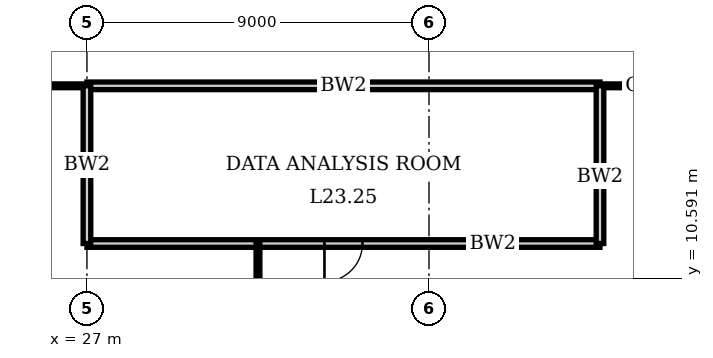
"""IFC4 building model, lengths in metres.
Left out: names, types, materials, properties, quantities, classifications, styles, units other than length and angle.
Written with IfcOpenShell. Run it as: python <this file> out.ifc"""

import sys

from ifc_helpers import new_model, si_unit, direction, frame, frame_2d, origin, place, context, subcontext, project, spatial, rectangle, extrude, element, fill, save


model = new_model("IFC4")
c1 = context("Model", 3, precision=1e-05, world=origin(), true_north=direction((0.0, 1.0)))
c2 = subcontext(c1, "Body", "Model", "MODEL_VIEW")
j1 = project(units=[si_unit("LENGTHUNIT", "METRE"), si_unit("PLANEANGLEUNIT", "RADIAN")], contexts=[c1])
p1 = place(None, origin())
s1 = spatial("IfcSite", under=j1, at=p1, CompositionType="ELEMENT")
p2 = place(p1, origin())
s2 = spatial("IfcBuilding", under=s1, at=p2, CompositionType="ELEMENT")
p3 = place(p2, frame((0.0, 0.0, 97.0)))
s3 = spatial("IfcBuildingStorey", under=s2, at=p3, CompositionType="ELEMENT", Elevation=97.0)
p4 = place(p3, frame((27.0, 11.5, 0.0), z_axis=(0.0, 0.0, 1.0), x_axis=(1.0, 0.0, 0.0)))
e1 = element("IfcWall", 1, at=p4, inside=s3, PredefinedType="SOLIDWALL", context=c2, shape_type="SweptSolid", body=[
    extrude(rectangle(XDim=13.5, YDim=0.2, at=frame_2d((6.75, 0.0))), origin(), (0.0, 0.0, 1.0), 3.75),
])
p5 = place(p4, frame((6.25, 0.0, 0.0)))
e2 = element("IfcOpeningElement", 2, at=p5, cuts=e1, PredefinedType="OPENING", context=c2, shape_type="SweptSolid", body=[
    extrude(rectangle(XDim=1.0, YDim=2.4, at=frame_2d((0.5, 1.2))), frame((0.0, 0.11, 0.0), z_axis=(0.0, -1.0, 0.0), x_axis=(1.0, 0.0, 0.0)), (0.0, 0.0, 1.0), 0.22),
])
p6 = place(p3, frame((27.0, 15.65, 0.0), z_axis=(0.0, 0.0, 1.0), x_axis=(1.0, 0.0, 0.0)))
e3 = element("IfcWall", 3, at=p6, inside=s3, PredefinedType="SOLIDWALL", context=c2, shape_type="SweptSolid", body=[
    extrude(rectangle(XDim=13.5, YDim=0.2, at=frame_2d((6.75, 0.0))), origin(), (0.0, 0.0, 1.0), 3.75),
])
p7 = place(p3, frame((15.65, 15.65, 0.0), z_axis=(0.0, 0.0, 1.0), x_axis=(1.0, 0.0, 0.0)))
e4 = element("IfcWall", 4, at=p7, inside=s3, PredefinedType="PARTITIONING", context=c2, shape_type="SweptSolid", body=[
    extrude(rectangle(XDim=11.35, YDim=0.1, at=frame_2d((5.675, 0.0))), origin(), (0.0, 0.0, 1.0), 3.75),
])
p8 = place(p7, frame((5.175, 0.0, 0.0)))
e5 = element("IfcOpeningElement", 5, at=p8, cuts=e4, PredefinedType="OPENING", context=c2, shape_type="SweptSolid", body=[
    extrude(rectangle(XDim=1.0, YDim=2.4, at=frame_2d((0.5, 1.2))), frame((0.0, 0.06, 0.0), z_axis=(0.0, -1.0, 0.0), x_axis=(1.0, 0.0, 0.0)), (0.0, 0.0, 1.0), 0.12),
])
p9 = place(p3, frame((40.5, 15.65, 0.0), z_axis=(0.0, 0.0, 1.0), x_axis=(1.0, 0.0, 0.0)))
e6 = element("IfcWall", 6, at=p9, inside=s3, PredefinedType="PARTITIONING", context=c2, shape_type="SweptSolid", body=[
    extrude(rectangle(XDim=6.85, YDim=0.1, at=frame_2d((3.425, 0.0))), origin(), (0.0, 0.0, 1.0), 3.75),
])
p10 = place(p9, frame((2.925, 0.0, 0.0)))
e7 = element("IfcOpeningElement", 7, at=p10, cuts=e6, PredefinedType="OPENING", context=c2, shape_type="SweptSolid", body=[
    extrude(rectangle(XDim=1.0, YDim=2.4, at=frame_2d((0.5, 1.2))), frame((0.0, 0.06, 0.0), z_axis=(0.0, -1.0, 0.0), x_axis=(1.0, 0.0, 0.0)), (0.0, 0.0, 1.0), 0.12),
])
p11 = place(p3, frame((27.0, 11.5, 0.0), z_axis=(0.0, 0.0, 1.0), x_axis=(0.0, 1.0, 0.0)))
e8 = element("IfcWall", 8, at=p11, inside=s3, PredefinedType="SOLIDWALL", context=c2, shape_type="SweptSolid", body=[
    extrude(rectangle(XDim=4.15, YDim=0.2, at=frame_2d((2.075, 0.0))), origin(), (0.0, 0.0, 1.0), 3.05),
])
p12 = place(p3, frame((31.5, 0.31, 0.0), z_axis=(0.0, 0.0, 1.0), x_axis=(0.0, 1.0, 0.0)))
e9 = element("IfcWall", 9, at=p12, inside=s3, PredefinedType="PARTITIONING", context=c2, shape_type="SweptSolid", body=[
    extrude(rectangle(XDim=11.2, YDim=0.1, at=frame_2d((5.6, 0.0))), origin(), (0.0, 0.0, 1.0), 3.75),
])
p13 = place(p3, frame((40.5, 11.5, 0.0), z_axis=(0.0, 0.0, 1.0), x_axis=(0.0, 1.0, 0.0)))
e10 = element("IfcWall", 10, at=p13, inside=s3, PredefinedType="SOLIDWALL", context=c2, shape_type="SweptSolid", body=[
    extrude(rectangle(XDim=4.15, YDim=0.2, at=frame_2d((2.075, 0.0))), origin(), (0.0, 0.0, 1.0), 3.75),
])
p14 = place(p5, origin())
e11 = element("IfcDoor", 11, at=p14, inside=s3, OperationType="SINGLE_SWING_LEFT", PredefinedType="DOOR", context=c2, shape_type="SweptSolid", body=[
    extrude(rectangle(XDim=1.0, YDim=2.4, at=frame_2d((0.5, 1.2))), frame((0.0, 0.035, 0.0), z_axis=(0.0, -1.0, 0.0), x_axis=(1.0, 0.0, 0.0)), (0.0, 0.0, 1.0), 0.07),
])
fill(e2, e11)
save(model, sys.argv[1])
